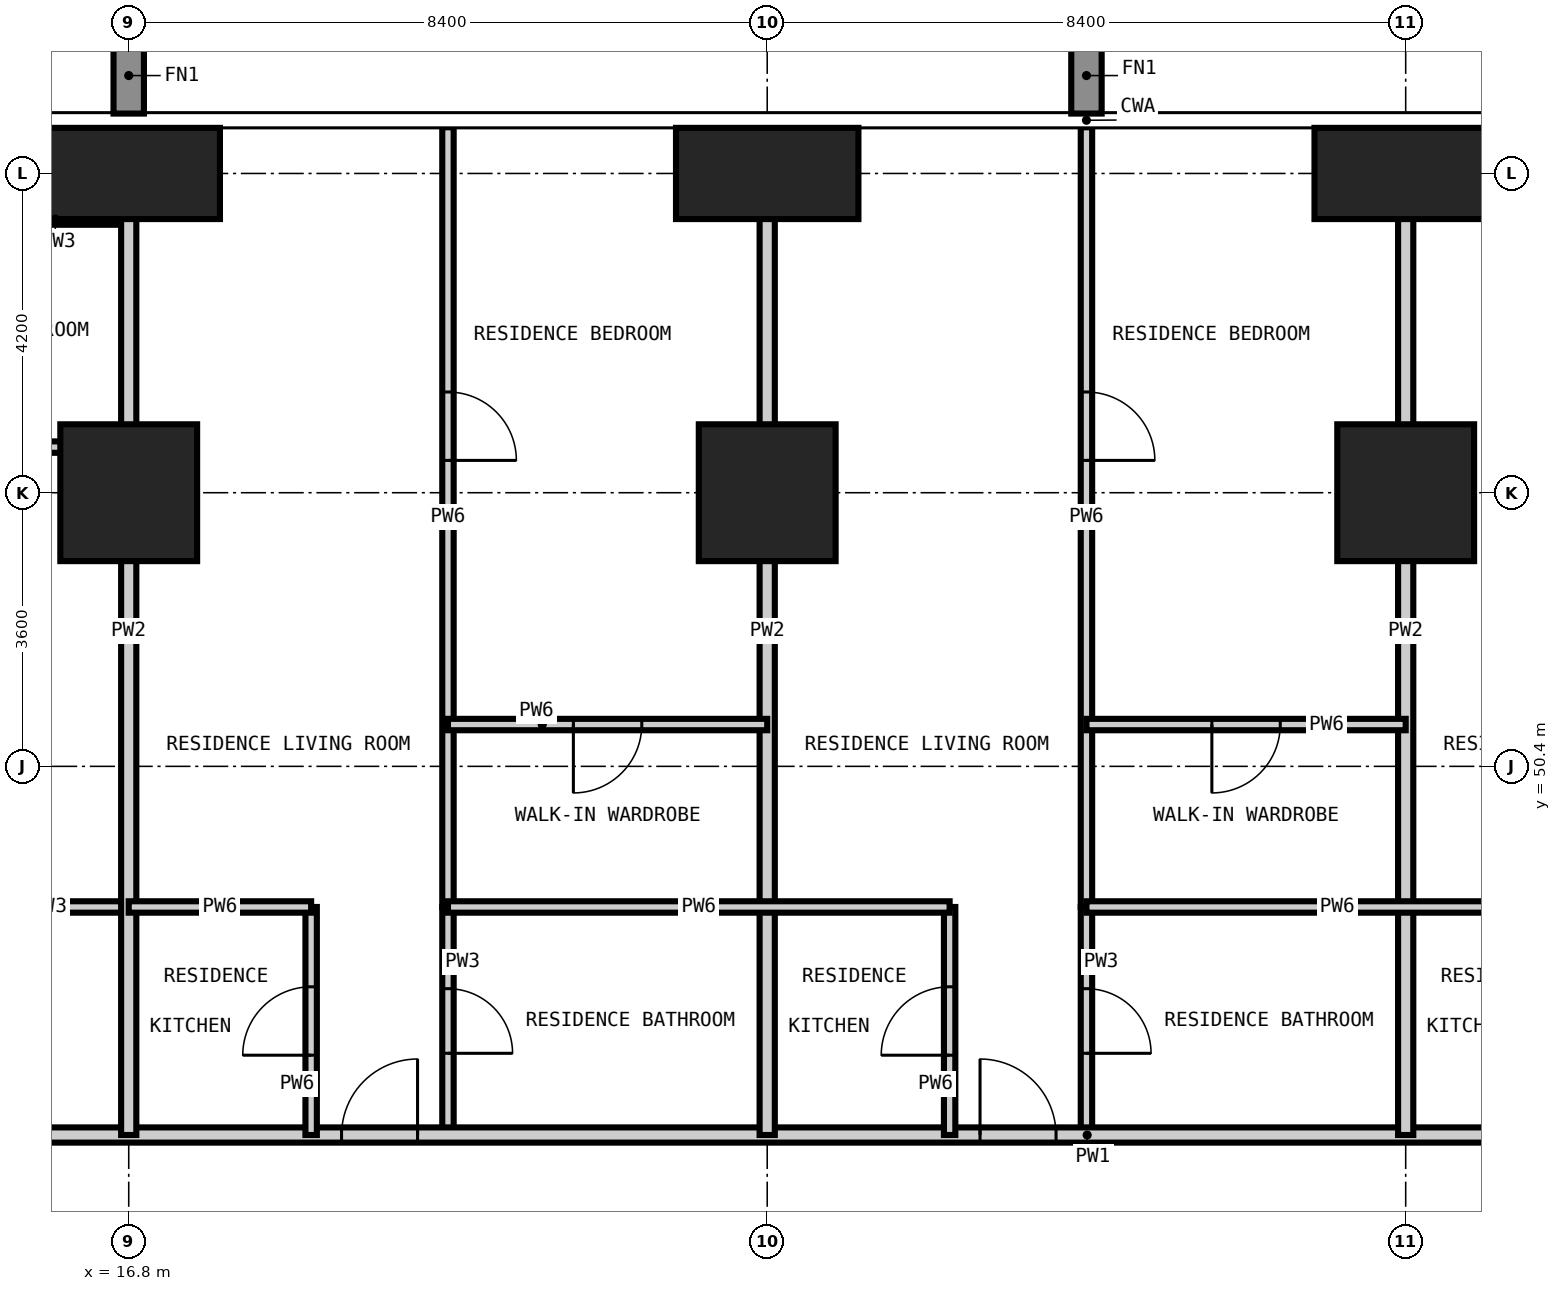
"""IFC4 building model, lengths in metres.
Left out: names, types, materials, properties, quantities, classifications, styles, units other than length and angle.
Written with IfcOpenShell. Run it as: python <this file> out.ifc"""

import sys

from ifc_helpers import new_model, si_unit, direction, frame, frame_2d, origin, origin_2d, place, context, subcontext, project, spatial, rectangle, extrude, element, fill, save


model = new_model("IFC4")
c1 = context("Model", 3, precision=1e-05, world=origin(), true_north=direction((0.0, 1.0)))
c2 = subcontext(c1, "Body", "Model", "MODEL_VIEW")
j1 = project(units=[si_unit("LENGTHUNIT", "METRE"), si_unit("PLANEANGLEUNIT", "RADIAN")], contexts=[c1])
p1 = place(None, origin())
s1 = spatial("IfcSite", under=j1, at=p1, CompositionType="ELEMENT")
p2 = place(p1, origin())
s2 = spatial("IfcBuilding", under=s1, at=p2, CompositionType="ELEMENT")
p3 = place(p2, frame((0.0, 0.0, 52.2)))
s3 = spatial("IfcBuildingStorey", under=s2, at=p3, CompositionType="ELEMENT", Elevation=52.2)
p4 = place(p3, frame((16.8, 54.0, -0.35), z_axis=(0.0, 0.0, 1.0), x_axis=(1.0, 0.0, 0.0)))
e1 = element("IfcColumn", 1, at=p4, inside=s3, PredefinedType="COLUMN", context=c2, shape_type="SweptSolid", body=[
    extrude(rectangle(XDim=1.8, YDim=1.8, at=origin_2d()), origin(), (0.0, 0.0, 1.0), 3.6),
])
p5 = place(p3, frame((16.8, 58.2, -0.35), z_axis=(0.0, 0.0, 1.0), x_axis=(1.0, 0.0, 0.0)))
e2 = element("IfcColumn", 2, at=p5, inside=s3, PredefinedType="COLUMN", context=c2, shape_type="SweptSolid", body=[
    extrude(rectangle(XDim=2.4, YDim=1.2, at=origin_2d()), origin(), (0.0, 0.0, 1.0), 3.6),
])
p6 = place(p3, frame((25.2, 54.0, -0.35), z_axis=(0.0, 0.0, 1.0), x_axis=(1.0, 0.0, 0.0)))
e3 = element("IfcColumn", 3, at=p6, inside=s3, PredefinedType="COLUMN", context=c2, shape_type="SweptSolid", body=[
    extrude(rectangle(XDim=1.8, YDim=1.8, at=origin_2d()), origin(), (0.0, 0.0, 1.0), 3.6),
])
p7 = place(p3, frame((25.2, 58.2, -0.35), z_axis=(0.0, 0.0, 1.0), x_axis=(1.0, 0.0, 0.0)))
e4 = element("IfcColumn", 4, at=p7, inside=s3, PredefinedType="COLUMN", context=c2, shape_type="SweptSolid", body=[
    extrude(rectangle(XDim=2.4, YDim=1.2, at=origin_2d()), origin(), (0.0, 0.0, 1.0), 3.6),
])
p8 = place(p3, frame((33.6, 54.0, -0.35), z_axis=(0.0, 0.0, 1.0), x_axis=(1.0, 0.0, 0.0)))
e5 = element("IfcColumn", 5, at=p8, inside=s3, PredefinedType="COLUMN", context=c2, shape_type="SweptSolid", body=[
    extrude(rectangle(XDim=1.8, YDim=1.8, at=origin_2d()), origin(), (0.0, 0.0, 1.0), 3.6),
])
p9 = place(p3, frame((33.6, 58.2, -0.35), z_axis=(0.0, 0.0, 1.0), x_axis=(1.0, 0.0, 0.0)))
e6 = element("IfcColumn", 6, at=p9, inside=s3, PredefinedType="COLUMN", context=c2, shape_type="SweptSolid", body=[
    extrude(rectangle(XDim=2.4, YDim=1.2, at=origin_2d()), origin(), (0.0, 0.0, 1.0), 3.6),
])
p10 = place(p3, frame((21.0, 45.55, 0.0), z_axis=(0.0, 0.0, 1.0), x_axis=(0.0, 1.0, 0.0)))
e7 = element("IfcWall", 7, at=p10, inside=s3, PredefinedType="PARTITIONING", context=c2, shape_type="SweptSolid", body=[
    extrude(rectangle(XDim=3.0, YDim=0.15, at=frame_2d((1.5, 0.0))), origin(), (0.0, 0.0, 1.0), 3.25),
])
p11 = place(p10, frame((1.075, 0.0, 0.0)))
e8 = element("IfcOpeningElement", 8, at=p11, cuts=e7, PredefinedType="OPENING", context=c2, shape_type="SweptSolid", body=[
    extrude(rectangle(XDim=0.85, YDim=2.1, at=frame_2d((0.425, 1.05))), frame((0.0, 0.085, 0.0), z_axis=(0.0, -1.0, 0.0), x_axis=(1.0, 0.0, 0.0)), (0.0, 0.0, 1.0), 0.17),
])
p12 = place(p3, frame((29.4, 45.55, 0.0), z_axis=(0.0, 0.0, 1.0), x_axis=(0.0, 1.0, 0.0)))
e9 = element("IfcWall", 9, at=p12, inside=s3, PredefinedType="PARTITIONING", context=c2, shape_type="SweptSolid", body=[
    extrude(rectangle(XDim=3.0, YDim=0.15, at=frame_2d((1.5, 0.0))), origin(), (0.0, 0.0, 1.0), 3.25),
])
p13 = place(p12, frame((1.075, 0.0, 0.0)))
e10 = element("IfcOpeningElement", 10, at=p13, cuts=e9, PredefinedType="OPENING", context=c2, shape_type="SweptSolid", body=[
    extrude(rectangle(XDim=0.85, YDim=2.1, at=frame_2d((0.425, 1.05))), frame((0.0, 0.085, 0.0), z_axis=(0.0, -1.0, 0.0), x_axis=(1.0, 0.0, 0.0)), (0.0, 0.0, 1.0), 0.17),
])
p14 = place(p3, frame((12.65, 48.55, 0.0), z_axis=(0.0, 0.0, 1.0), x_axis=(1.0, 0.0, 0.0)))
e11 = element("IfcWall", 11, at=p14, inside=s3, PredefinedType="PARTITIONING", context=c2, shape_type="SweptSolid", body=[
    extrude(rectangle(XDim=4.15, YDim=0.15, at=frame_2d((2.075, 0.0))), origin(), (0.0, 0.0, 1.0), 3.25),
])
p15 = place(p14, frame((1.65, 0.0, 0.0)))
e12 = element("IfcOpeningElement", 12, at=p15, cuts=e11, PredefinedType="OPENING", context=c2, shape_type="SweptSolid", body=[
    extrude(rectangle(XDim=0.85, YDim=2.1, at=frame_2d((0.425, 1.05))), frame((0.0, 0.085, 0.0), z_axis=(0.0, -1.0, 0.0), x_axis=(1.0, 0.0, 0.0)), (0.0, 0.0, 1.0), 0.17),
])
p16 = place(p3, frame((13.2, 57.6, 0.0), z_axis=(0.0, 0.0, 1.0), x_axis=(1.0, 0.0, 0.0)))
e13 = element("IfcWall", 13, at=p16, inside=s3, PredefinedType="PARTITIONING", context=c2, shape_type="SweptSolid", body=[
    extrude(rectangle(XDim=3.6, YDim=0.15, at=frame_2d((1.8, 0.0))), origin(), (0.0, 0.0, 1.0), 3.25),
])
p17 = place(p16, frame((1.375, 0.0, 0.0)))
e14 = element("IfcOpeningElement", 14, at=p17, cuts=e13, PredefinedType="OPENING", context=c2, shape_type="SweptSolid", body=[
    extrude(rectangle(XDim=0.85, YDim=2.1, at=frame_2d((0.425, 1.05))), frame((0.0, 0.085, 0.0), z_axis=(0.0, -1.0, 0.0), x_axis=(1.0, 0.0, 0.0)), (0.0, 0.0, 1.0), 0.17),
])
p18 = place(p3, frame((12.65, 45.55, 0.0), z_axis=(0.0, 0.0, 1.0), x_axis=(1.0, 0.0, 0.0)))
e15 = element("IfcWall", 15, at=p18, inside=s3, PredefinedType="PARTITIONING", context=c2, shape_type="SweptSolid", body=[
    extrude(rectangle(XDim=32.3, YDim=0.2, at=frame_2d((16.15, 0.0))), origin(), (0.0, 0.0, 1.0), 3.25),
])
p19 = place(p18, frame((6.95, 0.0, 0.0)))
e16 = element("IfcOpeningElement", 16, at=p19, cuts=e15, PredefinedType="OPENING", context=c2, shape_type="SweptSolid", body=[
    extrude(rectangle(XDim=1.0, YDim=2.2, at=frame_2d((0.5, 1.1))), frame((0.0, 0.11, 0.0), z_axis=(0.0, -1.0, 0.0), x_axis=(1.0, 0.0, 0.0)), (0.0, 0.0, 1.0), 0.22),
])
p20 = place(p18, frame((15.35, 0.0, 0.0)))
e17 = element("IfcOpeningElement", 17, at=p20, cuts=e15, PredefinedType="OPENING", context=c2, shape_type="SweptSolid", body=[
    extrude(rectangle(XDim=1.0, YDim=2.2, at=frame_2d((0.5, 1.1))), frame((0.0, 0.11, 0.0), z_axis=(0.0, -1.0, 0.0), x_axis=(1.0, 0.0, 0.0)), (0.0, 0.0, 1.0), 0.22),
])
p21 = place(p18, frame((23.75, 0.0, 0.0)))
e18 = element("IfcOpeningElement", 18, at=p21, cuts=e15, PredefinedType="OPENING", context=c2, shape_type="SweptSolid", body=[
    extrude(rectangle(XDim=1.0, YDim=2.2, at=frame_2d((0.5, 1.1))), frame((0.0, 0.11, 0.0), z_axis=(0.0, -1.0, 0.0), x_axis=(1.0, 0.0, 0.0)), (0.0, 0.0, 1.0), 0.22),
])
for number, where, z_axis, x_axis in (
    (19, (16.8, 45.55, 0.0), (0.0, 0.0, 1.0), (0.0, 1.0, 0.0)),
    (20, (25.2, 45.55, 0.0), (0.0, 0.0, 1.0), (0.0, 1.0, 0.0)),
    (21, (33.6, 45.55, 0.0), (0.0, 0.0, 1.0), (0.0, 1.0, 0.0)),
):
    element("IfcWall", number, at=place(p3, frame(where, z_axis=z_axis, x_axis=x_axis)), inside=s3, PredefinedType="PARTITIONING", context=c2, shape_type="SweptSolid", body=[
        extrude(rectangle(XDim=13.258, YDim=0.2, at=frame_2d((6.629, 0.0))), origin(), (0.0, 0.0, 1.0), 3.25),
    ])
p22 = place(p3, frame((19.2, 45.55, 0.0), z_axis=(0.0, 0.0, 1.0), x_axis=(0.0, 1.0, 0.0)))
e22 = element("IfcWall", 22, at=p22, inside=s3, PredefinedType="PARTITIONING", context=c2, shape_type="SweptSolid", body=[
    extrude(rectangle(XDim=3.0, YDim=0.15, at=frame_2d((1.5, 0.0))), origin(), (0.0, 0.0, 1.0), 3.25),
])
p23 = place(p22, frame((1.05, 0.0, 0.0)))
e23 = element("IfcOpeningElement", 23, at=p23, cuts=e22, PredefinedType="OPENING", context=c2, shape_type="SweptSolid", body=[
    extrude(rectangle(XDim=0.9, YDim=2.1, at=frame_2d((0.45, 1.05))), frame((0.0, 0.085, 0.0), z_axis=(0.0, -1.0, 0.0), x_axis=(1.0, 0.0, 0.0)), (0.0, 0.0, 1.0), 0.17),
])
p24 = place(p3, frame((21.0, 48.55, 0.0), z_axis=(0.0, 0.0, 1.0), x_axis=(0.0, 1.0, 0.0)))
e24 = element("IfcWall", 24, at=p24, inside=s3, PredefinedType="PARTITIONING", context=c2, shape_type="SweptSolid", body=[
    extrude(rectangle(XDim=10.258, YDim=0.15, at=frame_2d((5.129, 0.0))), origin(), (0.0, 0.0, 1.0), 3.25),
])
p25 = place(p24, frame((5.875, 0.0, 0.0)))
e25 = element("IfcOpeningElement", 25, at=p25, cuts=e24, PredefinedType="OPENING", context=c2, shape_type="SweptSolid", body=[
    extrude(rectangle(XDim=0.9, YDim=2.1, at=frame_2d((0.45, 1.05))), frame((0.0, 0.085, 0.0), z_axis=(0.0, -1.0, 0.0), x_axis=(1.0, 0.0, 0.0)), (0.0, 0.0, 1.0), 0.17),
])
p26 = place(p3, frame((27.6, 45.55, 0.0), z_axis=(0.0, 0.0, 1.0), x_axis=(0.0, 1.0, 0.0)))
e26 = element("IfcWall", 26, at=p26, inside=s3, PredefinedType="PARTITIONING", context=c2, shape_type="SweptSolid", body=[
    extrude(rectangle(XDim=3.0, YDim=0.15, at=frame_2d((1.5, 0.0))), origin(), (0.0, 0.0, 1.0), 3.25),
])
p27 = place(p26, frame((1.05, 0.0, 0.0)))
e27 = element("IfcOpeningElement", 27, at=p27, cuts=e26, PredefinedType="OPENING", context=c2, shape_type="SweptSolid", body=[
    extrude(rectangle(XDim=0.9, YDim=2.1, at=frame_2d((0.45, 1.05))), frame((0.0, 0.085, 0.0), z_axis=(0.0, -1.0, 0.0), x_axis=(1.0, 0.0, 0.0)), (0.0, 0.0, 1.0), 0.17),
])
p28 = place(p3, frame((29.4, 48.55, 0.0), z_axis=(0.0, 0.0, 1.0), x_axis=(0.0, 1.0, 0.0)))
e28 = element("IfcWall", 28, at=p28, inside=s3, PredefinedType="PARTITIONING", context=c2, shape_type="SweptSolid", body=[
    extrude(rectangle(XDim=10.258, YDim=0.15, at=frame_2d((5.129, 0.0))), origin(), (0.0, 0.0, 1.0), 3.25),
])
p29 = place(p28, frame((5.875, 0.0, 0.0)))
e29 = element("IfcOpeningElement", 29, at=p29, cuts=e28, PredefinedType="OPENING", context=c2, shape_type="SweptSolid", body=[
    extrude(rectangle(XDim=0.9, YDim=2.1, at=frame_2d((0.45, 1.05))), frame((0.0, 0.085, 0.0), z_axis=(0.0, -1.0, 0.0), x_axis=(1.0, 0.0, 0.0)), (0.0, 0.0, 1.0), 0.17),
])
p30 = place(p3, frame((16.8, 48.55, 0.0), z_axis=(0.0, 0.0, 1.0), x_axis=(1.0, 0.0, 0.0)))
e30 = element("IfcWall", 30, at=p30, inside=s3, PredefinedType="PARTITIONING", context=c2, shape_type="SweptSolid", body=[
    extrude(rectangle(XDim=2.4, YDim=0.15, at=frame_2d((1.2, 0.0))), origin(), (0.0, 0.0, 1.0), 3.25),
])
for number, where, z_axis, x_axis in (
    (31, (21.0, 48.55, 0.0), (0.0, 0.0, 1.0), (1.0, 0.0, 0.0)),
    (32, (29.4, 48.55, 0.0), (0.0, 0.0, 1.0), (1.0, 0.0, 0.0)),
):
    element("IfcWall", number, at=place(p3, frame(where, z_axis=z_axis, x_axis=x_axis)), inside=s3, PredefinedType="PARTITIONING", context=c2, shape_type="SweptSolid", body=[
        extrude(rectangle(XDim=6.6, YDim=0.15, at=frame_2d((3.3, 0.0))), origin(), (0.0, 0.0, 1.0), 3.25),
    ])
p31 = place(p3, frame((21.0, 50.95, 0.0), z_axis=(0.0, 0.0, 1.0), x_axis=(1.0, 0.0, 0.0)))
e33 = element("IfcWall", 33, at=p31, inside=s3, PredefinedType="PARTITIONING", context=c2, shape_type="SweptSolid", body=[
    extrude(rectangle(XDim=4.2, YDim=0.15, at=frame_2d((2.1, 0.0))), origin(), (0.0, 0.0, 1.0), 3.25),
])
p32 = place(p31, frame((1.65, 0.0, 0.0)))
e34 = element("IfcOpeningElement", 34, at=p32, cuts=e33, PredefinedType="OPENING", context=c2, shape_type="SweptSolid", body=[
    extrude(rectangle(XDim=0.9, YDim=2.1, at=frame_2d((0.45, 1.05))), frame((0.0, 0.085, 0.0), z_axis=(0.0, -1.0, 0.0), x_axis=(1.0, 0.0, 0.0)), (0.0, 0.0, 1.0), 0.17),
])
p33 = place(p3, frame((29.4, 50.95, 0.0), z_axis=(0.0, 0.0, 1.0), x_axis=(1.0, 0.0, 0.0)))
e35 = element("IfcWall", 35, at=p33, inside=s3, PredefinedType="PARTITIONING", context=c2, shape_type="SweptSolid", body=[
    extrude(rectangle(XDim=4.2, YDim=0.15, at=frame_2d((2.1, 0.0))), origin(), (0.0, 0.0, 1.0), 3.25),
])
p34 = place(p33, frame((1.65, 0.0, 0.0)))
e36 = element("IfcOpeningElement", 36, at=p34, cuts=e35, PredefinedType="OPENING", context=c2, shape_type="SweptSolid", body=[
    extrude(rectangle(XDim=0.9, YDim=2.1, at=frame_2d((0.45, 1.05))), frame((0.0, 0.085, 0.0), z_axis=(0.0, -1.0, 0.0), x_axis=(1.0, 0.0, 0.0)), (0.0, 0.0, 1.0), 0.17),
])
p35 = place(p3, frame((-0.008, 54.6, 0.0), z_axis=(0.0, 0.0, 1.0), x_axis=(1.0, 0.0, 0.0)))
e37 = element("IfcWall", 37, at=p35, inside=s3, PredefinedType="PARTITIONING", context=c2, shape_type="SweptSolid", body=[
    extrude(rectangle(XDim=16.808, YDim=0.15, at=frame_2d((8.404, 0.0))), origin(), (0.0, 0.0, 1.0), 3.25),
])
p36 = place(p35, frame((4.958, 0.0, 0.0)))
e38 = element("IfcOpeningElement", 38, at=p36, cuts=e37, PredefinedType="OPENING", context=c2, shape_type="SweptSolid", body=[
    extrude(rectangle(XDim=0.9, YDim=2.1, at=frame_2d((0.45, 1.05))), frame((0.0, 0.085, 0.0), z_axis=(0.0, -1.0, 0.0), x_axis=(1.0, 0.0, 0.0)), (0.0, 0.0, 1.0), 0.17),
])
p37 = place(p19, origin())
e39 = element("IfcDoor", 39, at=p37, inside=s3, OperationType="SINGLE_SWING_RIGHT", PredefinedType="DOOR", context=c2, shape_type="SweptSolid", body=[
    extrude(rectangle(XDim=1.0, YDim=2.2, at=frame_2d((0.5, 1.1))), frame((0.0, 0.025, 0.0), z_axis=(0.0, -1.0, 0.0), x_axis=(1.0, 0.0, 0.0)), (0.0, 0.0, 1.0), 0.05),
])
fill(e16, e39)
p38 = place(p23, origin())
e40 = element("IfcDoor", 40, at=p38, inside=s3, OperationType="SINGLE_SWING_LEFT", PredefinedType="DOOR", context=c2, shape_type="SweptSolid", body=[
    extrude(rectangle(XDim=0.9, YDim=2.1, at=frame_2d((0.45, 1.05))), frame((0.0, 0.025, 0.0), z_axis=(0.0, -1.0, 0.0), x_axis=(1.0, 0.0, 0.0)), (0.0, 0.0, 1.0), 0.05),
])
fill(e23, e40)
p39 = place(p11, frame((0.85, 0.0, 0.0), z_axis=(0.0, 0.0, 1.0), x_axis=(-1.0, 0.0, 0.0)))
e41 = element("IfcDoor", 41, at=p39, inside=s3, OperationType="SINGLE_SWING_RIGHT", PredefinedType="DOOR", context=c2, shape_type="SweptSolid", body=[
    extrude(rectangle(XDim=0.85, YDim=2.1, at=frame_2d((0.425, 1.05))), frame((0.0, 0.025, 0.0), z_axis=(0.0, -1.0, 0.0), x_axis=(1.0, 0.0, 0.0)), (0.0, 0.0, 1.0), 0.05),
])
fill(e8, e41)
p40 = place(p32, frame((0.9, 0.0, 0.0), z_axis=(0.0, 0.0, 1.0), x_axis=(-1.0, 0.0, 0.0)))
e42 = element("IfcDoor", 42, at=p40, inside=s3, OperationType="SINGLE_SWING_RIGHT", PredefinedType="DOOR", context=c2, shape_type="SweptSolid", body=[
    extrude(rectangle(XDim=0.9, YDim=2.1, at=frame_2d((0.45, 1.05))), frame((0.0, 0.025, 0.0), z_axis=(0.0, -1.0, 0.0), x_axis=(1.0, 0.0, 0.0)), (0.0, 0.0, 1.0), 0.05),
])
fill(e34, e42)
p41 = place(p25, frame((0.9, 0.0, 0.0), z_axis=(0.0, 0.0, 1.0), x_axis=(-1.0, 0.0, 0.0)))
e43 = element("IfcDoor", 43, at=p41, inside=s3, OperationType="SINGLE_SWING_RIGHT", PredefinedType="DOOR", context=c2, shape_type="SweptSolid", body=[
    extrude(rectangle(XDim=0.9, YDim=2.1, at=frame_2d((0.45, 1.05))), frame((0.0, 0.025, 0.0), z_axis=(0.0, -1.0, 0.0), x_axis=(1.0, 0.0, 0.0)), (0.0, 0.0, 1.0), 0.05),
])
fill(e25, e43)
p42 = place(p20, origin())
e44 = element("IfcDoor", 44, at=p42, inside=s3, OperationType="SINGLE_SWING_LEFT", PredefinedType="DOOR", context=c2, shape_type="SweptSolid", body=[
    extrude(rectangle(XDim=1.0, YDim=2.2, at=frame_2d((0.5, 1.1))), frame((0.0, 0.025, 0.0), z_axis=(0.0, -1.0, 0.0), x_axis=(1.0, 0.0, 0.0)), (0.0, 0.0, 1.0), 0.05),
])
fill(e17, e44)
p43 = place(p27, origin())
e45 = element("IfcDoor", 45, at=p43, inside=s3, OperationType="SINGLE_SWING_LEFT", PredefinedType="DOOR", context=c2, shape_type="SweptSolid", body=[
    extrude(rectangle(XDim=0.9, YDim=2.1, at=frame_2d((0.45, 1.05))), frame((0.0, 0.025, 0.0), z_axis=(0.0, -1.0, 0.0), x_axis=(1.0, 0.0, 0.0)), (0.0, 0.0, 1.0), 0.05),
])
fill(e27, e45)
p44 = place(p13, frame((0.85, 0.0, 0.0), z_axis=(0.0, 0.0, 1.0), x_axis=(-1.0, 0.0, 0.0)))
e46 = element("IfcDoor", 46, at=p44, inside=s3, OperationType="SINGLE_SWING_RIGHT", PredefinedType="DOOR", context=c2, shape_type="SweptSolid", body=[
    extrude(rectangle(XDim=0.85, YDim=2.1, at=frame_2d((0.425, 1.05))), frame((0.0, 0.025, 0.0), z_axis=(0.0, -1.0, 0.0), x_axis=(1.0, 0.0, 0.0)), (0.0, 0.0, 1.0), 0.05),
])
fill(e10, e46)
p45 = place(p34, frame((0.9, 0.0, 0.0), z_axis=(0.0, 0.0, 1.0), x_axis=(-1.0, 0.0, 0.0)))
e47 = element("IfcDoor", 47, at=p45, inside=s3, OperationType="SINGLE_SWING_RIGHT", PredefinedType="DOOR", context=c2, shape_type="SweptSolid", body=[
    extrude(rectangle(XDim=0.9, YDim=2.1, at=frame_2d((0.45, 1.05))), frame((0.0, 0.025, 0.0), z_axis=(0.0, -1.0, 0.0), x_axis=(1.0, 0.0, 0.0)), (0.0, 0.0, 1.0), 0.05),
])
fill(e36, e47)
p46 = place(p29, frame((0.9, 0.0, 0.0), z_axis=(0.0, 0.0, 1.0), x_axis=(-1.0, 0.0, 0.0)))
e48 = element("IfcDoor", 48, at=p46, inside=s3, OperationType="SINGLE_SWING_RIGHT", PredefinedType="DOOR", context=c2, shape_type="SweptSolid", body=[
    extrude(rectangle(XDim=0.9, YDim=2.1, at=frame_2d((0.45, 1.05))), frame((0.0, 0.025, 0.0), z_axis=(0.0, -1.0, 0.0), x_axis=(1.0, 0.0, 0.0)), (0.0, 0.0, 1.0), 0.05),
])
fill(e29, e48)
save(model, sys.argv[1])
